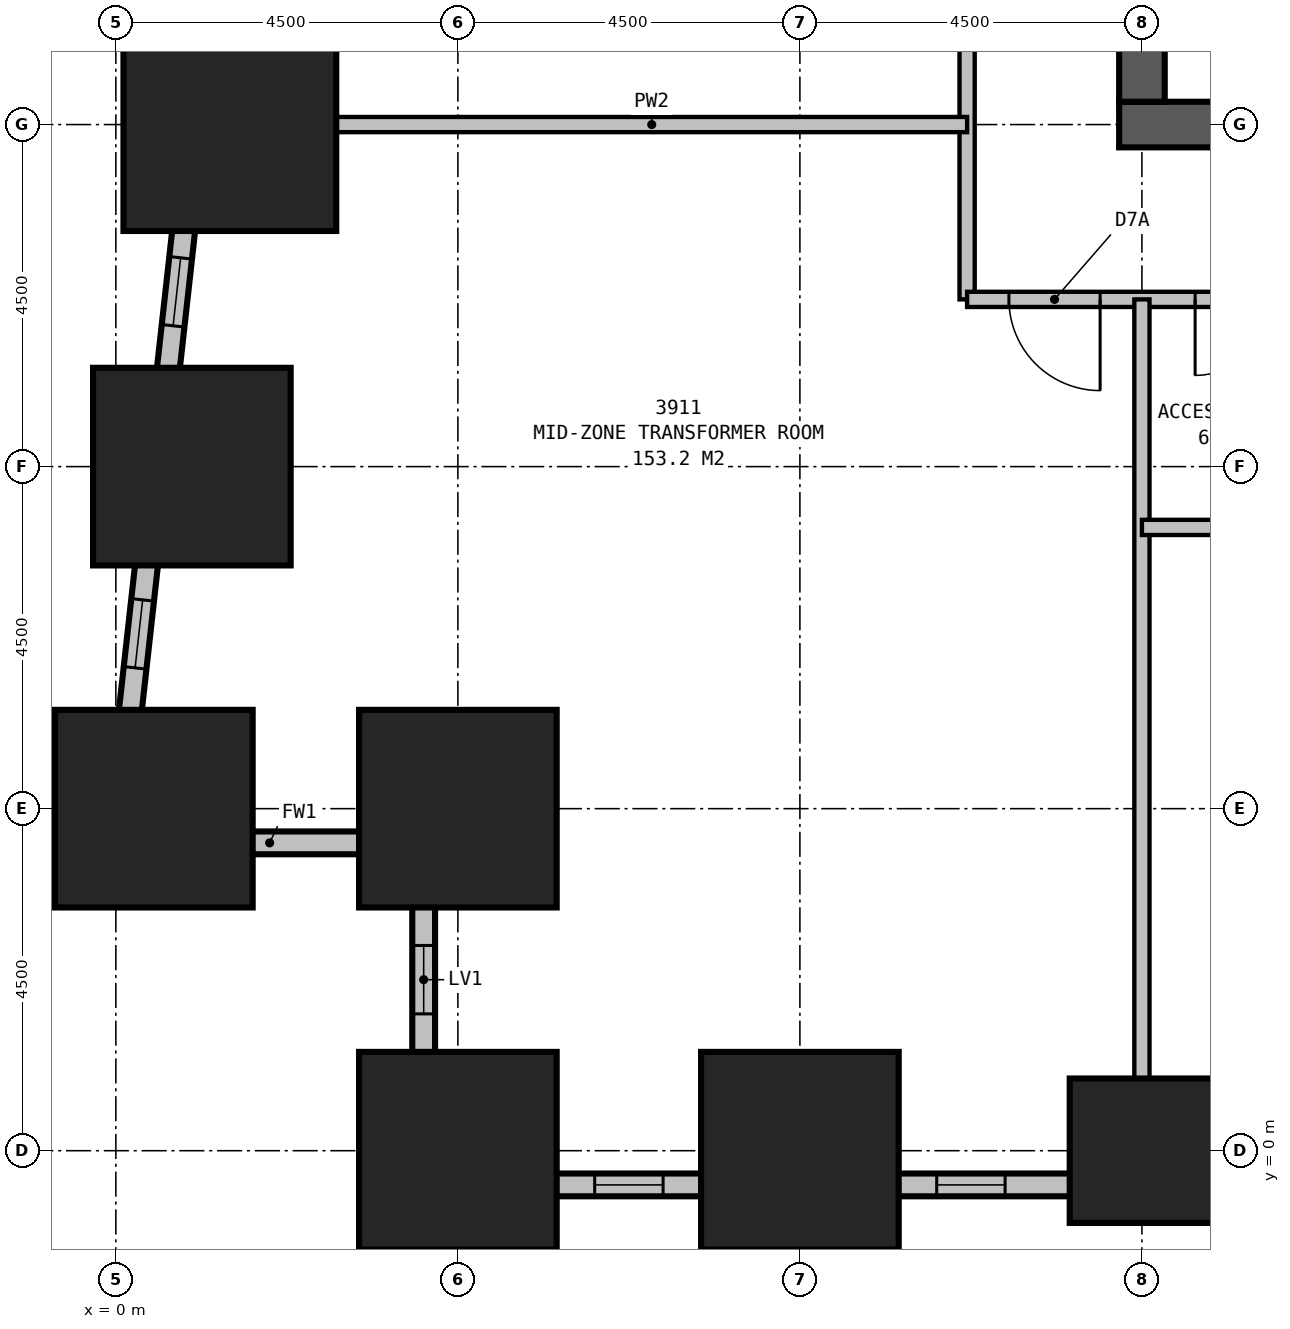
"""IFC4 building model, lengths in metres.
Left out: names, types, materials, properties, quantities, classifications, styles, units other than length and angle.
Written with IfcOpenShell. Run it as: python <this file> out.ifc"""

import sys

from ifc_helpers import new_model, si_unit, direction, frame, frame_2d, origin, origin_2d, place, context, subcontext, project, spatial, rectangle, extrude, element, fill, save


model = new_model("IFC4")
c1 = context("Model", 3, precision=1e-05, world=origin(), true_north=direction((0.0, 1.0)))
c2 = subcontext(c1, "Body", "Model", "MODEL_VIEW")
j1 = project(units=[si_unit("LENGTHUNIT", "METRE"), si_unit("PLANEANGLEUNIT", "RADIAN")], contexts=[c1])
p1 = place(None, origin())
s1 = spatial("IfcSite", under=j1, at=p1, CompositionType="ELEMENT")
p2 = place(p1, origin())
s2 = spatial("IfcBuilding", under=s1, at=p2, CompositionType="ELEMENT")
p3 = place(p2, frame((0.0, 0.0, 151.9)))
s3 = spatial("IfcBuildingStorey", under=s2, at=p3, CompositionType="ELEMENT", Elevation=151.9)
for number, where, z_axis, x_axis in (
    (1, (0.5, 4.5, 0.0), (0.0, 0.0, 1.0), (1.0, 0.0, 0.0)),
    (2, (4.5, 4.5, 0.0), (0.0, 0.0, 1.0), (1.0, 0.0, 0.0)),
    (3, (4.5, 0.0, 0.0), (0.0, 0.0, 1.0), (1.0, 0.0, 0.0)),
    (4, (9.0, 0.0, 0.0), (0.0, 0.0, 1.0), (1.0, 0.0, 0.0)),
):
    element("IfcColumn", number, at=place(p3, frame(where, z_axis=z_axis, x_axis=x_axis)), inside=s3, PredefinedType="COLUMN", context=c2, shape_type="SweptSolid", body=[
        extrude(rectangle(XDim=2.6, YDim=2.6, at=origin_2d()), origin(), (0.0, 0.0, 1.0), 6.0),
    ])
p4 = place(p3, frame((13.5, 0.0, 0.0), z_axis=(0.0, 0.0, 1.0), x_axis=(1.0, 0.0, 0.0)))
e5 = element("IfcColumn", 5, at=p4, inside=s3, PredefinedType="COLUMN", context=c2, shape_type="SweptSolid", body=[
    extrude(rectangle(XDim=1.9, YDim=1.9, at=origin_2d()), origin(), (0.0, 0.0, 1.0), 6.0),
])
p5 = place(p3, frame((1.5, 13.5, 0.0), z_axis=(0.0, 0.0, 1.0), x_axis=(1.0, 0.0, 0.0)))
e6 = element("IfcColumn", 6, at=p5, inside=s3, PredefinedType="COLUMN", context=c2, shape_type="SweptSolid", body=[
    extrude(rectangle(XDim=2.8, YDim=2.8, at=origin_2d()), origin(), (0.0, 0.0, 1.0), 6.0),
])
p6 = place(p3, frame((1.0, 9.0, 0.0), z_axis=(0.0, 0.0, 1.0), x_axis=(1.0, 0.0, 0.0)))
e7 = element("IfcColumn", 7, at=p6, inside=s3, PredefinedType="COLUMN", context=c2, shape_type="SweptSolid", body=[
    extrude(rectangle(XDim=2.6, YDim=2.6, at=origin_2d()), origin(), (0.0, 0.0, 1.0), 6.0),
])
p7 = place(p3, frame((13.2, 13.5, 0.0), z_axis=(0.0, 0.0, 1.0), x_axis=(1.0, 0.0, 0.0)))
e8 = element("IfcWall", 8, at=p7, inside=s3, PredefinedType="SHEAR", context=c2, shape_type="SweptSolid", body=[
    extrude(rectangle(XDim=23.1, YDim=0.6, at=frame_2d((11.55, 0.0))), origin(), (0.0, 0.0, 1.0), 6.0),
])
p8 = place(p3, frame((13.5, 16.5, 0.0), z_axis=(0.0, 0.0, 1.0), x_axis=(0.0, -1.0, 0.0)))
e9 = element("IfcWall", 9, at=p8, inside=s3, PredefinedType="SHEAR", context=c2, shape_type="SweptSolid", body=[
    extrude(rectangle(XDim=2.7, YDim=0.6, at=frame_2d((1.35, 0.0))), origin(), (0.0, 0.0, 1.0), 6.0),
])
p9 = place(p3, frame((-0.153, 4.05, 0.0), z_axis=(0.0, 0.0, 1.0), x_axis=(1.0, 0.0, 0.0)))
e10 = element("IfcWall", 10, at=p9, inside=s3, PredefinedType="STANDARD", context=c2, shape_type="SweptSolid", body=[
    extrude(rectangle(XDim=4.353, YDim=0.3, at=frame_2d((2.176, 0.0))), origin(), (0.0, 0.0, 1.0), 3.35),
])
p10 = place(p3, frame((4.05, 4.2, 0.0), z_axis=(0.0, 0.0, 1.0), x_axis=(0.0, -1.0, 0.0)))
e11 = element("IfcWall", 11, at=p10, inside=s3, PredefinedType="STANDARD", context=c2, shape_type="SweptSolid", body=[
    extrude(rectangle(XDim=4.8, YDim=0.3, at=frame_2d((2.4, 0.0))), origin(), (0.0, 0.0, 1.0), 3.35),
])
p11 = place(p10, frame((1.5, 0.0, 0.5)))
e12 = element("IfcOpeningElement", 12, at=p11, cuts=e11, PredefinedType="OPENING", context=c2, shape_type="SweptSolid", body=[
    extrude(rectangle(XDim=0.9, YDim=1.2, at=frame_2d((0.45, 0.6))), frame((0.0, 0.16, 0.0), z_axis=(0.0, -1.0, 0.0), x_axis=(1.0, 0.0, 0.0)), (0.0, 0.0, 1.0), 0.32),
])
p12 = place(p3, frame((3.9, -0.45, 0.0), z_axis=(0.0, 0.0, 1.0), x_axis=(1.0, 0.0, 0.0)))
e13 = element("IfcWall", 13, at=p12, inside=s3, PredefinedType="STANDARD", context=c2, shape_type="SweptSolid", body=[
    extrude(rectangle(XDim=41.7, YDim=0.3, at=frame_2d((20.85, 0.0))), origin(), (0.0, 0.0, 1.0), 3.35),
])
p13 = place(p12, frame((2.4, 0.0, 0.5)))
e14 = element("IfcOpeningElement", 14, at=p13, cuts=e13, PredefinedType="OPENING", context=c2, shape_type="SweptSolid", body=[
    extrude(rectangle(XDim=0.9, YDim=1.2, at=frame_2d((0.45, 0.6))), frame((0.0, 0.16, 0.0), z_axis=(0.0, -1.0, 0.0), x_axis=(1.0, 0.0, 0.0)), (0.0, 0.0, 1.0), 0.32),
])
p14 = place(p12, frame((6.9, 0.0, 0.5)))
e15 = element("IfcOpeningElement", 15, at=p14, cuts=e13, PredefinedType="OPENING", context=c2, shape_type="SweptSolid", body=[
    extrude(rectangle(XDim=0.9, YDim=1.2, at=frame_2d((0.45, 0.6))), frame((0.0, 0.16, 0.0), z_axis=(0.0, -1.0, 0.0), x_axis=(1.0, 0.0, 0.0)), (0.0, 0.0, 1.0), 0.32),
])
p15 = place(p12, frame((11.4, 0.0, 0.5)))
e16 = element("IfcOpeningElement", 16, at=p15, cuts=e13, PredefinedType="OPENING", context=c2, shape_type="SweptSolid", body=[
    extrude(rectangle(XDim=0.9, YDim=1.2, at=frame_2d((0.45, 0.6))), frame((0.0, 0.16, 0.0), z_axis=(0.0, -1.0, 0.0), x_axis=(1.0, 0.0, 0.0)), (0.0, 0.0, 1.0), 0.32),
])
p16 = place(p12, frame((15.9, 0.0, 0.5)))
e17 = element("IfcOpeningElement", 17, at=p16, cuts=e13, PredefinedType="OPENING", context=c2, shape_type="SweptSolid", body=[
    extrude(rectangle(XDim=0.9, YDim=1.2, at=frame_2d((0.45, 0.6))), frame((0.0, 0.16, 0.0), z_axis=(0.0, -1.0, 0.0), x_axis=(1.0, 0.0, 0.0)), (0.0, 0.0, 1.0), 0.32),
])
p17 = place(p12, frame((20.4, 0.0, 0.5)))
e18 = element("IfcOpeningElement", 18, at=p17, cuts=e13, PredefinedType="OPENING", context=c2, shape_type="SweptSolid", body=[
    extrude(rectangle(XDim=0.9, YDim=1.2, at=frame_2d((0.45, 0.6))), frame((0.0, 0.16, 0.0), z_axis=(0.0, -1.0, 0.0), x_axis=(1.0, 0.0, 0.0)), (0.0, 0.0, 1.0), 0.32),
])
p18 = place(p12, frame((24.9, 0.0, 0.5)))
e19 = element("IfcOpeningElement", 19, at=p18, cuts=e13, PredefinedType="OPENING", context=c2, shape_type="SweptSolid", body=[
    extrude(rectangle(XDim=0.9, YDim=1.2, at=frame_2d((0.45, 0.6))), frame((0.0, 0.16, 0.0), z_axis=(0.0, -1.0, 0.0), x_axis=(1.0, 0.0, 0.0)), (0.0, 0.0, 1.0), 0.32),
])
p19 = place(p12, frame((29.4, 0.0, 0.5)))
e20 = element("IfcOpeningElement", 20, at=p19, cuts=e13, PredefinedType="OPENING", context=c2, shape_type="SweptSolid", body=[
    extrude(rectangle(XDim=0.9, YDim=1.2, at=frame_2d((0.45, 0.6))), frame((0.0, 0.16, 0.0), z_axis=(0.0, -1.0, 0.0), x_axis=(1.0, 0.0, 0.0)), (0.0, 0.0, 1.0), 0.32),
])
p20 = place(p12, frame((33.9, 0.0, 0.5)))
e21 = element("IfcOpeningElement", 21, at=p20, cuts=e13, PredefinedType="OPENING", context=c2, shape_type="SweptSolid", body=[
    extrude(rectangle(XDim=0.9, YDim=1.2, at=frame_2d((0.45, 0.6))), frame((0.0, 0.16, 0.0), z_axis=(0.0, -1.0, 0.0), x_axis=(1.0, 0.0, 0.0)), (0.0, 0.0, 1.0), 0.32),
])
p21 = place(p12, frame((38.4, 0.0, 0.5)))
e22 = element("IfcOpeningElement", 22, at=p21, cuts=e13, PredefinedType="OPENING", context=c2, shape_type="SweptSolid", body=[
    extrude(rectangle(XDim=0.9, YDim=1.2, at=frame_2d((0.45, 0.6))), frame((0.0, 0.16, 0.0), z_axis=(0.0, -1.0, 0.0), x_axis=(1.0, 0.0, 0.0)), (0.0, 0.0, 1.0), 0.32),
])
p22 = place(p3, frame((3.614, 36.599, 0.0), z_axis=(0.0, 0.0, 1.0), x_axis=(-0.110429082637, -0.993884006164, 0.0)))
e23 = element("IfcWall", 23, at=p22, inside=s3, PredefinedType="STANDARD", context=c2, shape_type="SweptSolid", body=[
    extrude(rectangle(XDim=32.899, YDim=0.3, at=frame_2d((16.45, 0.0))), origin(), (0.0, 0.0, 1.0), 3.35),
])
p23 = place(p22, frame((2.367, 0.0, 0.5)))
e24 = element("IfcOpeningElement", 24, at=p23, cuts=e23, PredefinedType="OPENING", context=c2, shape_type="SweptSolid", body=[
    extrude(rectangle(XDim=0.9, YDim=1.2, at=frame_2d((0.45, 0.6))), frame((0.0, 0.16, 0.0), z_axis=(0.0, -1.0, 0.0), x_axis=(1.0, 0.0, 0.0)), (0.0, 0.0, 1.0), 0.32),
])
p24 = place(p22, frame((6.895, 0.0, 0.5)))
e25 = element("IfcOpeningElement", 25, at=p24, cuts=e23, PredefinedType="OPENING", context=c2, shape_type="SweptSolid", body=[
    extrude(rectangle(XDim=0.9, YDim=1.2, at=frame_2d((0.45, 0.6))), frame((0.0, 0.16, 0.0), z_axis=(0.0, -1.0, 0.0), x_axis=(1.0, 0.0, 0.0)), (0.0, 0.0, 1.0), 0.32),
])
p25 = place(p22, frame((11.422, 0.0, 0.5)))
e26 = element("IfcOpeningElement", 26, at=p25, cuts=e23, PredefinedType="OPENING", context=c2, shape_type="SweptSolid", body=[
    extrude(rectangle(XDim=0.9, YDim=1.2, at=frame_2d((0.45, 0.6))), frame((0.0, 0.16, 0.0), z_axis=(0.0, -1.0, 0.0), x_axis=(1.0, 0.0, 0.0)), (0.0, 0.0, 1.0), 0.32),
])
p26 = place(p22, frame((15.95, 0.0, 0.5)))
e27 = element("IfcOpeningElement", 27, at=p26, cuts=e23, PredefinedType="OPENING", context=c2, shape_type="SweptSolid", body=[
    extrude(rectangle(XDim=0.9, YDim=1.2, at=frame_2d((0.45, 0.6))), frame((0.0, 0.16, 0.0), z_axis=(0.0, -1.0, 0.0), x_axis=(1.0, 0.0, 0.0)), (0.0, 0.0, 1.0), 0.32),
])
p27 = place(p22, frame((20.478, 0.0, 0.5)))
e28 = element("IfcOpeningElement", 28, at=p27, cuts=e23, PredefinedType="OPENING", context=c2, shape_type="SweptSolid", body=[
    extrude(rectangle(XDim=0.9, YDim=1.2, at=frame_2d((0.45, 0.6))), frame((0.0, 0.16, 0.0), z_axis=(0.0, -1.0, 0.0), x_axis=(1.0, 0.0, 0.0)), (0.0, 0.0, 1.0), 0.32),
])
p28 = place(p22, frame((25.005, 0.0, 0.5)))
e29 = element("IfcOpeningElement", 29, at=p28, cuts=e23, PredefinedType="OPENING", context=c2, shape_type="SweptSolid", body=[
    extrude(rectangle(XDim=0.9, YDim=1.2, at=frame_2d((0.45, 0.6))), frame((0.0, 0.16, 0.0), z_axis=(0.0, -1.0, 0.0), x_axis=(1.0, 0.0, 0.0)), (0.0, 0.0, 1.0), 0.32),
])
p29 = place(p22, frame((29.533, 0.0, 0.5)))
e30 = element("IfcOpeningElement", 30, at=p29, cuts=e23, PredefinedType="OPENING", context=c2, shape_type="SweptSolid", body=[
    extrude(rectangle(XDim=0.9, YDim=1.2, at=frame_2d((0.45, 0.6))), frame((0.0, 0.16, 0.0), z_axis=(0.0, -1.0, 0.0), x_axis=(1.0, 0.0, 0.0)), (0.0, 0.0, 1.0), 0.32),
])
p30 = place(p3, frame((11.2, 11.2, 0.0), z_axis=(0.0, 0.0, 1.0), x_axis=(1.0, 0.0, 0.0)))
e31 = element("IfcWall", 31, at=p30, inside=s3, PredefinedType="PARTITIONING", context=c2, shape_type="SweptSolid", body=[
    extrude(rectangle(XDim=27.1, YDim=0.2, at=frame_2d((13.55, 0.0))), origin(), (0.0, 0.0, 1.0), 5.75),
])
p31 = place(p30, frame((4.0, 0.0, 0.0), z_axis=(0.0, 0.0, 1.0), x_axis=(-1.0, 0.0, 0.0)))
e32 = element("IfcOpeningElement", 32, at=p31, cuts=e31, PredefinedType="OPENING", context=c2, shape_type="SweptSolid", body=[
    extrude(rectangle(XDim=1.0, YDim=2.1, at=frame_2d((0.5, 1.05))), frame((0.0, 0.11, 0.0), z_axis=(0.0, -1.0, 0.0), x_axis=(1.0, 0.0, 0.0)), (0.0, 0.0, 1.0), 0.22),
])
p32 = place(p30, frame((6.1, 0.0, 0.0), z_axis=(0.0, 0.0, 1.0), x_axis=(-1.0, 0.0, 0.0)))
e33 = element("IfcOpeningElement", 33, at=p32, cuts=e31, PredefinedType="OPENING", context=c2, shape_type="SweptSolid", body=[
    extrude(rectangle(XDim=1.0, YDim=2.1, at=frame_2d((0.5, 1.05))), frame((0.0, 0.11, 0.0), z_axis=(0.0, -1.0, 0.0), x_axis=(1.0, 0.0, 0.0)), (0.0, 0.0, 1.0), 0.22),
])
p33 = place(p30, frame((9.05, 0.0, 0.0), z_axis=(0.0, 0.0, 1.0), x_axis=(-1.0, 0.0, 0.0)))
e34 = element("IfcOpeningElement", 34, at=p33, cuts=e31, PredefinedType="OPENING", context=c2, shape_type="SweptSolid", body=[
    extrude(rectangle(XDim=1.8, YDim=2.4, at=frame_2d((0.9, 1.2))), frame((0.0, 0.11, 0.0), z_axis=(0.0, -1.0, 0.0), x_axis=(1.0, 0.0, 0.0)), (0.0, 0.0, 1.0), 0.22),
])
p34 = place(p30, frame((21.75, 0.0, 0.0), z_axis=(0.0, 0.0, 1.0), x_axis=(-1.0, 0.0, 0.0)))
e35 = element("IfcOpeningElement", 35, at=p34, cuts=e31, PredefinedType="OPENING", context=c2, shape_type="SweptSolid", body=[
    extrude(rectangle(XDim=1.0, YDim=2.1, at=frame_2d((0.5, 1.05))), frame((0.0, 0.11, 0.0), z_axis=(0.0, -1.0, 0.0), x_axis=(1.0, 0.0, 0.0)), (0.0, 0.0, 1.0), 0.22),
])
p35 = place(p30, frame((1.75, 0.0, 0.0), z_axis=(0.0, 0.0, 1.0), x_axis=(-1.0, 0.0, 0.0)))
e36 = element("IfcOpeningElement", 36, at=p35, cuts=e31, PredefinedType="OPENING", context=c2, shape_type="SweptSolid", body=[
    extrude(rectangle(XDim=1.2, YDim=2.1, at=frame_2d((0.6, 1.05))), frame((0.0, 0.11, 0.0), z_axis=(0.0, -1.0, 0.0), x_axis=(1.0, 0.0, 0.0)), (0.0, 0.0, 1.0), 0.22),
])
p36 = place(p30, frame((26.55, 0.0, 0.0), z_axis=(0.0, 0.0, 1.0), x_axis=(-1.0, 0.0, 0.0)))
e37 = element("IfcOpeningElement", 37, at=p36, cuts=e31, PredefinedType="OPENING", context=c2, shape_type="SweptSolid", body=[
    extrude(rectangle(XDim=1.2, YDim=2.1, at=frame_2d((0.6, 1.05))), frame((0.0, 0.11, 0.0), z_axis=(0.0, -1.0, 0.0), x_axis=(1.0, 0.0, 0.0)), (0.0, 0.0, 1.0), 0.22),
])
p37 = place(p3, frame((11.2, 11.2, 0.0), z_axis=(0.0, 0.0, 1.0), x_axis=(0.0, 1.0, 0.0)))
e38 = element("IfcWall", 38, at=p37, inside=s3, PredefinedType="PARTITIONING", context=c2, shape_type="SweptSolid", body=[
    extrude(rectangle(XDim=18.1, YDim=0.2, at=frame_2d((9.05, 0.0))), origin(), (0.0, 0.0, 1.0), 5.75),
])
p38 = place(p37, frame((3.95, 0.0, 0.0)))
e39 = element("IfcOpeningElement", 39, at=p38, cuts=e38, PredefinedType="OPENING", context=c2, shape_type="SweptSolid", body=[
    extrude(rectangle(XDim=1.0, YDim=2.1, at=frame_2d((0.5, 1.05))), frame((0.0, 0.11, 0.0), z_axis=(0.0, -1.0, 0.0), x_axis=(1.0, 0.0, 0.0)), (0.0, 0.0, 1.0), 0.22),
])
p39 = place(p37, frame((7.25, 0.0, 0.0)))
e40 = element("IfcOpeningElement", 40, at=p39, cuts=e38, PredefinedType="OPENING", context=c2, shape_type="SweptSolid", body=[
    extrude(rectangle(XDim=1.2, YDim=2.1, at=frame_2d((0.6, 1.05))), frame((0.0, 0.11, 0.0), z_axis=(0.0, -1.0, 0.0), x_axis=(1.0, 0.0, 0.0)), (0.0, 0.0, 1.0), 0.22),
])
p40 = place(p3, frame((13.5, 11.2, 0.0), z_axis=(0.0, 0.0, 1.0), x_axis=(0.0, -1.0, 0.0)))
e41 = element("IfcWall", 41, at=p40, inside=s3, PredefinedType="PARTITIONING", context=c2, shape_type="SweptSolid", body=[
    extrude(rectangle(XDim=10.25, YDim=0.2, at=frame_2d((5.125, 0.0))), origin(), (0.0, 0.0, 1.0), 4.75),
])
p41 = place(p3, frame((11.2, 13.5, 0.0), z_axis=(0.0, 0.0, 1.0), x_axis=(-1.0, 0.0, 0.0)))
e42 = element("IfcWall", 42, at=p41, inside=s3, PredefinedType="PARTITIONING", context=c2, shape_type="SweptSolid", body=[
    extrude(rectangle(XDim=8.299, YDim=0.2, at=frame_2d((4.149, 0.0))), origin(), (0.0, 0.0, 1.0), 1.85),
])
p42 = place(p3, frame((13.5, 8.2, 0.0), z_axis=(0.0, 0.0, 1.0), x_axis=(1.0, 0.0, 0.0)))
e43 = element("IfcWall", 43, at=p42, inside=s3, PredefinedType="PARTITIONING", context=c2, shape_type="SweptSolid", body=[
    extrude(rectangle(XDim=2.4, YDim=0.2, at=frame_2d((1.2, 0.0))), origin(), (0.0, 0.0, 1.0), 5.75),
])
p43 = place(p11, origin())
e44 = element("IfcWindow", 44, at=p43, inside=s3, PartitioningType="SINGLE_PANEL", PredefinedType="USERDEFINED", context=c2, shape_type="SweptSolid", body=[
    extrude(rectangle(XDim=0.9, YDim=1.2, at=frame_2d((0.45, 0.6))), frame((0.0, 0.03, 0.0), z_axis=(0.0, -1.0, 0.0), x_axis=(1.0, 0.0, 0.0)), (0.0, 0.0, 1.0), 0.06),
])
fill(e12, e44)
p44 = place(p13, origin())
e45 = element("IfcWindow", 45, at=p44, inside=s3, PartitioningType="SINGLE_PANEL", PredefinedType="USERDEFINED", context=c2, shape_type="SweptSolid", body=[
    extrude(rectangle(XDim=0.9, YDim=1.2, at=frame_2d((0.45, 0.6))), frame((0.0, 0.03, 0.0), z_axis=(0.0, -1.0, 0.0), x_axis=(1.0, 0.0, 0.0)), (0.0, 0.0, 1.0), 0.06),
])
fill(e14, e45)
p45 = place(p14, origin())
e46 = element("IfcWindow", 46, at=p45, inside=s3, PartitioningType="SINGLE_PANEL", PredefinedType="USERDEFINED", context=c2, shape_type="SweptSolid", body=[
    extrude(rectangle(XDim=0.9, YDim=1.2, at=frame_2d((0.45, 0.6))), frame((0.0, 0.03, 0.0), z_axis=(0.0, -1.0, 0.0), x_axis=(1.0, 0.0, 0.0)), (0.0, 0.0, 1.0), 0.06),
])
fill(e15, e46)
p46 = place(p28, origin())
e47 = element("IfcWindow", 47, at=p46, inside=s3, PartitioningType="SINGLE_PANEL", PredefinedType="USERDEFINED", context=c2, shape_type="SweptSolid", body=[
    extrude(rectangle(XDim=0.9, YDim=1.2, at=frame_2d((0.45, 0.6))), frame((0.0, 0.03, 0.0), z_axis=(0.0, -1.0, 0.0), x_axis=(1.0, 0.0, 0.0)), (0.0, 0.0, 1.0), 0.06),
])
fill(e29, e47)
p47 = place(p29, origin())
e48 = element("IfcWindow", 48, at=p47, inside=s3, PartitioningType="SINGLE_PANEL", PredefinedType="USERDEFINED", context=c2, shape_type="SweptSolid", body=[
    extrude(rectangle(XDim=0.9, YDim=1.2, at=frame_2d((0.45, 0.6))), frame((0.0, 0.03, 0.0), z_axis=(0.0, -1.0, 0.0), x_axis=(1.0, 0.0, 0.0)), (0.0, 0.0, 1.0), 0.06),
])
fill(e30, e48)
p48 = place(p31, origin())
e49 = element("IfcDoor", 49, at=p48, inside=s3, OperationType="SINGLE_SWING_RIGHT", PredefinedType="DOOR", context=c2, shape_type="SweptSolid", body=[
    extrude(rectangle(XDim=1.0, YDim=2.1, at=frame_2d((0.5, 1.05))), frame((0.0, 0.025, 0.0), z_axis=(0.0, -1.0, 0.0), x_axis=(1.0, 0.0, 0.0)), (0.0, 0.0, 1.0), 0.05),
])
fill(e32, e49)
p49 = place(p35, origin())
e50 = element("IfcDoor", 50, at=p49, inside=s3, OperationType="SINGLE_SWING_LEFT", PredefinedType="DOOR", context=c2, shape_type="SweptSolid", body=[
    extrude(rectangle(XDim=1.2, YDim=2.1, at=frame_2d((0.6, 1.05))), frame((0.0, 0.025, 0.0), z_axis=(0.0, -1.0, 0.0), x_axis=(1.0, 0.0, 0.0)), (0.0, 0.0, 1.0), 0.05),
])
fill(e36, e50)
save(model, sys.argv[1])
